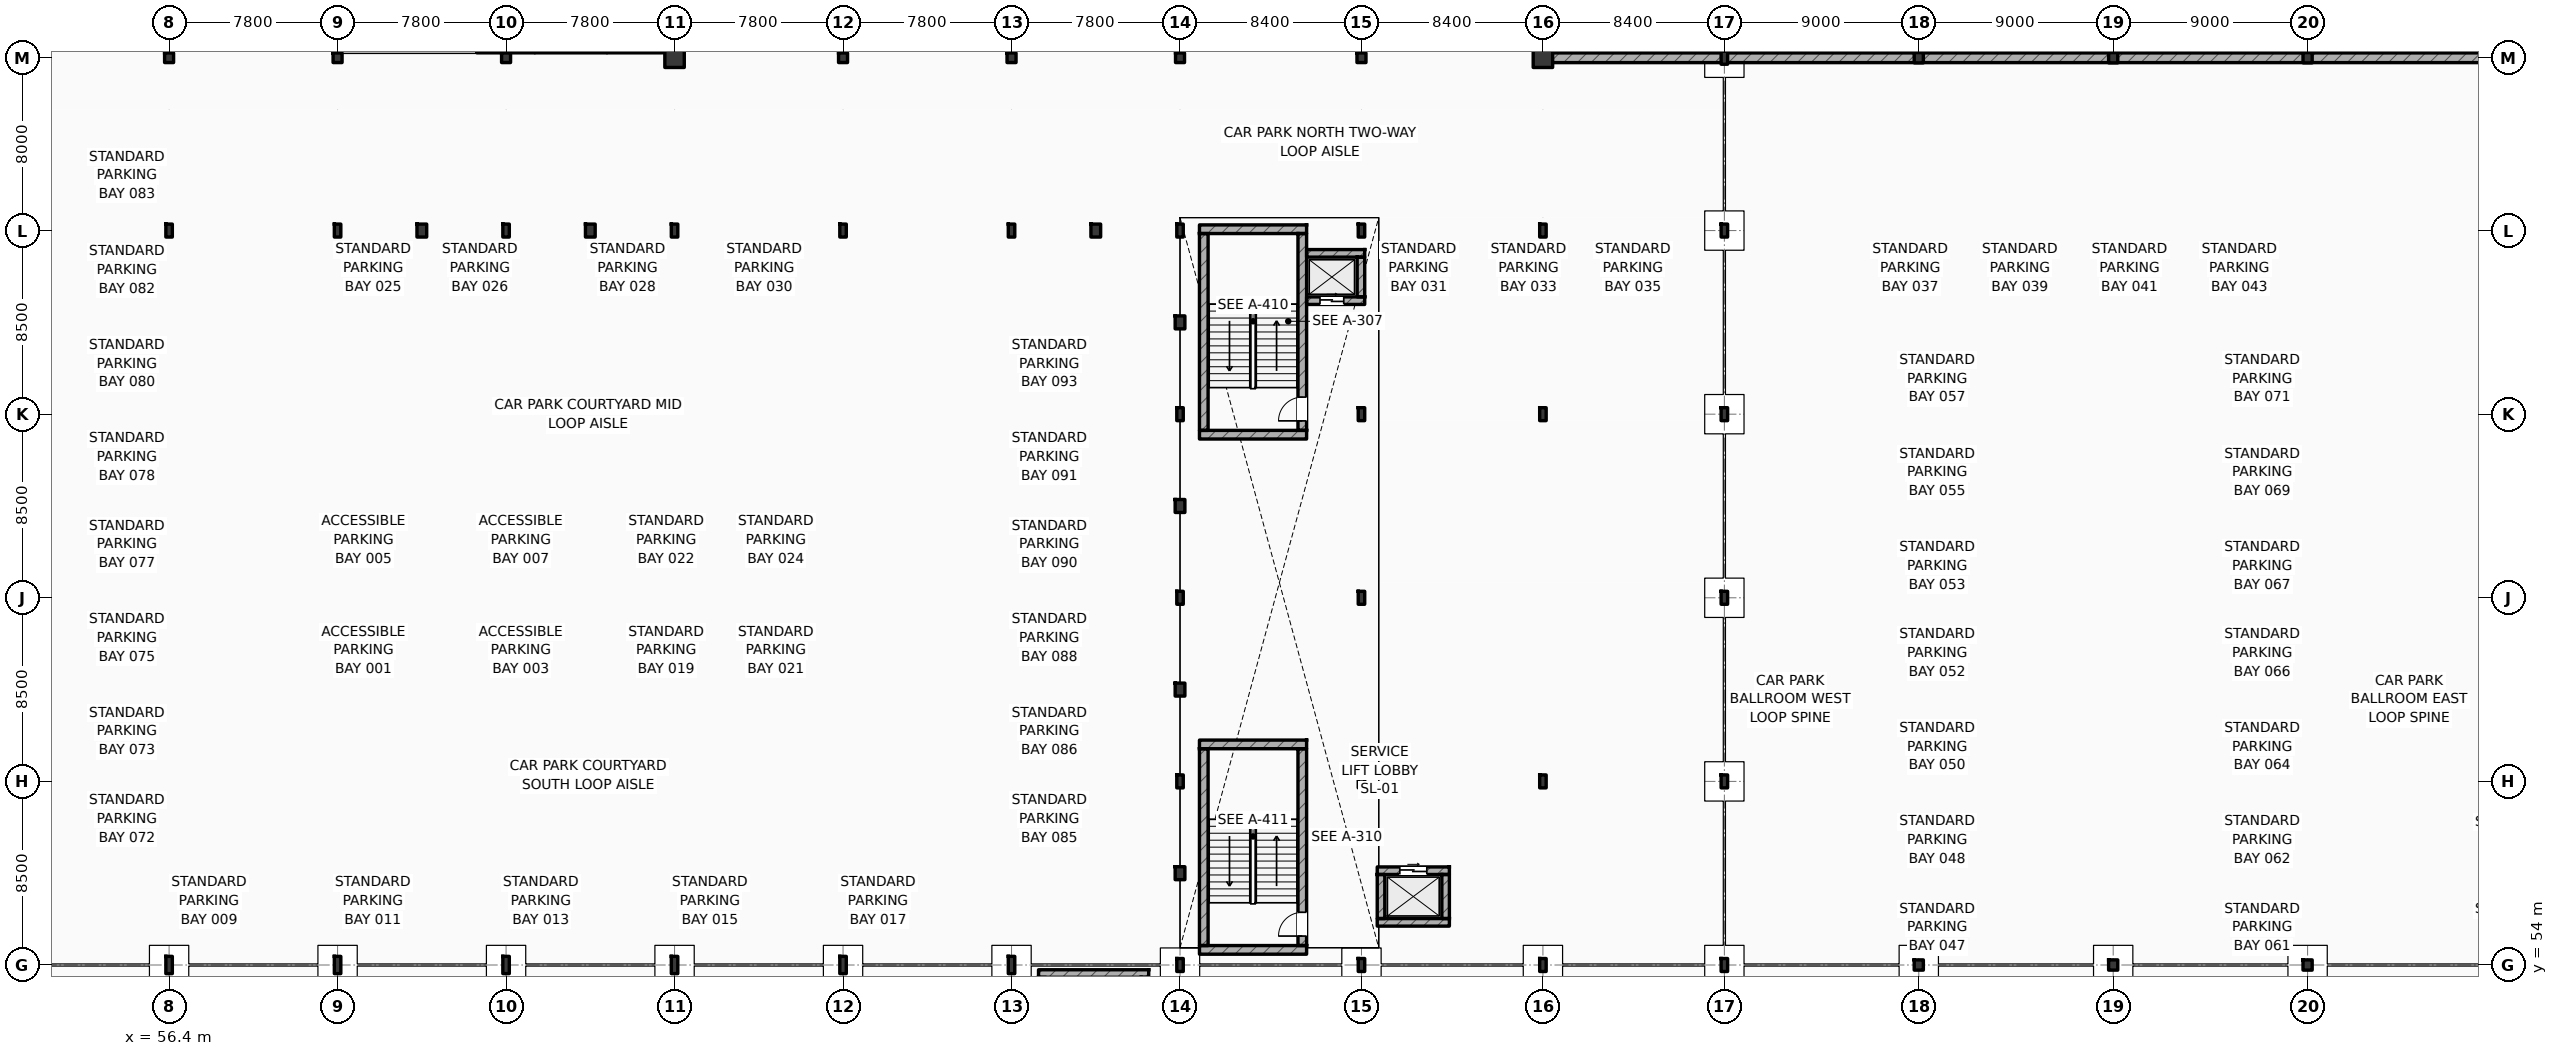
"""IFC4 building model, lengths in metres.
Left out: names, types, materials, properties, quantities, classifications, styles, units other than length and angle.
Written with IfcOpenShell. Run it as: python <this file> out.ifc"""

import sys

from ifc_helpers import new_model, si_unit, direction, frame, frame_2d, origin, origin_2d, place, context, subcontext, project, spatial, rectangle, i_section, extrude, element, fill, save


model = new_model("IFC4")
c1 = context("Model", 3, precision=1e-05, world=origin(), true_north=direction((0.0, 1.0)))
c2 = subcontext(c1, "Body", "Model", "MODEL_VIEW")
j1 = project(units=[si_unit("LENGTHUNIT", "METRE"), si_unit("PLANEANGLEUNIT", "RADIAN")], contexts=[c1])
p1 = place(None, origin())
s1 = spatial("IfcSite", under=j1, at=p1, CompositionType="ELEMENT")
p2 = place(p1, origin())
s2 = spatial("IfcBuilding", under=s1, at=p2, CompositionType="ELEMENT")
p3 = place(p2, frame((0.0, 0.0, -4.5)))
s3 = spatial("IfcBuildingStorey", under=s2, at=p3, CompositionType="ELEMENT", Elevation=-4.5)
p4 = place(p3, frame((172.0, 96.0, 0.0), z_axis=(0.0, 0.0, 1.0), x_axis=(-1.0, 0.0, 0.0)))
e1 = element("IfcWall", 1, at=p4, inside=s3, PredefinedType="SOLIDWALL", context=c2, shape_type="SweptSolid", body=[
    extrude(rectangle(XDim=52.0, YDim=0.45, at=frame_2d((26.0, 0.0))), origin(), (0.0, 0.0, 1.0), 4.5),
])
p5 = place(p3, frame((120.0, 96.0, 0.0), z_axis=(0.0, 0.0, 1.0), x_axis=(0.0, 1.0, 0.0)))
e2 = element("IfcWall", 2, at=p5, inside=s3, PredefinedType="SOLIDWALL", context=c2, shape_type="SweptSolid", body=[
    extrude(rectangle(XDim=22.0, YDim=0.45, at=frame_2d((11.0, 0.0))), origin(), (0.0, 0.0, 1.0), 4.5),
])
for number, where, z_axis, x_axis in (
    (3, (56.4, 96.0, 0.0), (0.0, 0.0, 1.0), (1.0, 0.0, 0.0)),
    (4, (64.2, 96.0, 0.0), (0.0, 0.0, 1.0), (1.0, 0.0, 0.0)),
    (5, (72.0, 96.0, 0.0), (0.0, 0.0, 1.0), (1.0, 0.0, 0.0)),
):
    element("IfcColumn", number, at=place(p3, frame(where, z_axis=z_axis, x_axis=x_axis)), inside=s3, PredefinedType="COLUMN", context=c2, shape_type="SweptSolid", body=[
        extrude(i_section(OverallWidth=0.416, OverallDepth=0.446, WebThickness=0.036, FlangeThickness=0.048, FilletRadius=0.015, at=origin_2d()), origin(), (0.0, 0.0, 1.0), 4.5),
    ])
p6 = place(p3, frame((79.8, 96.0, 0.0), z_axis=(0.0, 0.0, 1.0), x_axis=(1.0, 0.0, 0.0)))
e6 = element("IfcColumn", 6, at=p6, inside=s3, PredefinedType="COLUMN", context=c2, shape_type="SweptSolid", body=[
    extrude(rectangle(XDim=0.9, YDim=0.9, at=origin_2d()), origin(), (0.0, 0.0, 1.0), 4.5),
])
for number, where, z_axis, x_axis in (
    (7, (87.6, 96.0, 0.0), (0.0, 0.0, 1.0), (1.0, 0.0, 0.0)),
    (8, (95.4, 96.0, 0.0), (0.0, 0.0, 1.0), (1.0, 0.0, 0.0)),
    (9, (103.2, 96.0, 0.0), (0.0, 0.0, 1.0), (1.0, 0.0, 0.0)),
    (10, (111.6, 96.0, 0.0), (0.0, 0.0, 1.0), (1.0, 0.0, 0.0)),
):
    element("IfcColumn", number, at=place(p3, frame(where, z_axis=z_axis, x_axis=x_axis)), inside=s3, PredefinedType="COLUMN", context=c2, shape_type="SweptSolid", body=[
        extrude(i_section(OverallWidth=0.416, OverallDepth=0.446, WebThickness=0.036, FlangeThickness=0.048, FilletRadius=0.015, at=origin_2d()), origin(), (0.0, 0.0, 1.0), 4.5),
    ])
p7 = place(p3, frame((120.0, 96.0, 0.0), z_axis=(0.0, 0.0, 1.0), x_axis=(1.0, 0.0, 0.0)))
e11 = element("IfcColumn", 11, at=p7, inside=s3, PredefinedType="COLUMN", context=c2, shape_type="SweptSolid", body=[
    extrude(rectangle(XDim=0.9, YDim=0.9, at=origin_2d()), origin(), (0.0, 0.0, 1.0), 4.5),
])
for number, where, z_axis, x_axis in (
    (12, (56.4, 88.0, 0.0), (0.0, 0.0, 1.0), (1.0, 0.0, 0.0)),
    (13, (64.2, 88.0, 0.0), (0.0, 0.0, 1.0), (1.0, 0.0, 0.0)),
    (14, (72.0, 88.0, 0.0), (0.0, 0.0, 1.0), (1.0, 0.0, 0.0)),
    (15, (79.8, 88.0, 0.0), (0.0, 0.0, 1.0), (1.0, 0.0, 0.0)),
    (16, (87.6, 88.0, 0.0), (0.0, 0.0, 1.0), (1.0, 0.0, 0.0)),
    (17, (95.4, 88.0, 0.0), (0.0, 0.0, 1.0), (1.0, 0.0, 0.0)),
    (18, (103.2, 88.0, 0.0), (0.0, 0.0, 1.0), (1.0, 0.0, 0.0)),
    (19, (103.2, 54.0, 0.0), (0.0, 0.0, 1.0), (1.0, 0.0, 0.0)),
    (20, (103.2, 62.5, 0.0), (0.0, 0.0, 1.0), (1.0, 0.0, 0.0)),
    (21, (103.2, 71.0, 0.0), (0.0, 0.0, 1.0), (1.0, 0.0, 0.0)),
    (22, (103.2, 79.5, 0.0), (0.0, 0.0, 1.0), (1.0, 0.0, 0.0)),
    (23, (111.6, 54.0, 0.0), (0.0, 0.0, 1.0), (1.0, 0.0, 0.0)),
    (24, (111.6, 62.5, 0.0), (0.0, 0.0, 1.0), (1.0, 0.0, 0.0)),
    (25, (111.6, 71.0, 0.0), (0.0, 0.0, 1.0), (1.0, 0.0, 0.0)),
    (26, (111.6, 79.5, 0.0), (0.0, 0.0, 1.0), (1.0, 0.0, 0.0)),
    (27, (111.6, 88.0, 0.0), (0.0, 0.0, 1.0), (1.0, 0.0, 0.0)),
    (28, (120.0, 54.0, 0.0), (0.0, 0.0, 1.0), (1.0, 0.0, 0.0)),
    (29, (120.0, 62.5, 0.0), (0.0, 0.0, 1.0), (1.0, 0.0, 0.0)),
    (30, (120.0, 79.5, 0.0), (0.0, 0.0, 1.0), (1.0, 0.0, 0.0)),
    (31, (120.0, 88.0, 0.0), (0.0, 0.0, 1.0), (1.0, 0.0, 0.0)),
    (32, (128.4, 54.0, 0.0), (0.0, 0.0, 1.0), (1.0, 0.0, 0.0)),
    (33, (128.4, 62.5, 0.0), (0.0, 0.0, 1.0), (1.0, 0.0, 0.0)),
    (34, (128.4, 71.0, 0.0), (0.0, 0.0, 1.0), (1.0, 0.0, 0.0)),
    (35, (128.4, 79.5, 0.0), (0.0, 0.0, 1.0), (1.0, 0.0, 0.0)),
    (36, (128.4, 88.0, 0.0), (0.0, 0.0, 1.0), (1.0, 0.0, 0.0)),
    (37, (128.4, 96.0, 0.0), (0.0, 0.0, 1.0), (1.0, 0.0, 0.0)),
):
    element("IfcColumn", number, at=place(p3, frame(where, z_axis=z_axis, x_axis=x_axis)), inside=s3, PredefinedType="COLUMN", context=c2, shape_type="SweptSolid", body=[
        extrude(i_section(OverallWidth=0.3, OverallDepth=0.6, WebThickness=0.015, FlangeThickness=0.03, FilletRadius=0.027, at=origin_2d()), origin(), (0.0, 0.0, 1.0), 4.5),
    ])
for number, where, z_axis, x_axis in (
    (38, (137.4, 54.0, 0.0), (0.0, 0.0, 1.0), (1.0, 0.0, 0.0)),
    (39, (137.4, 96.0, 0.0), (0.0, 0.0, 1.0), (1.0, 0.0, 0.0)),
    (40, (146.4, 54.0, 0.0), (0.0, 0.0, 1.0), (1.0, 0.0, 0.0)),
    (41, (146.4, 96.0, 0.0), (0.0, 0.0, 1.0), (1.0, 0.0, 0.0)),
    (42, (155.4, 54.0, 0.0), (0.0, 0.0, 1.0), (1.0, 0.0, 0.0)),
    (43, (155.4, 96.0, 0.0), (0.0, 0.0, 1.0), (1.0, 0.0, 0.0)),
):
    element("IfcColumn", number, at=place(p3, frame(where, z_axis=z_axis, x_axis=x_axis)), inside=s3, PredefinedType="COLUMN", context=c2, shape_type="SweptSolid", body=[
        extrude(i_section(OverallWidth=0.424, OverallDepth=0.474, WebThickness=0.045, FlangeThickness=0.055, FilletRadius=0.015, at=origin_2d()), origin(), (0.0, 0.0, 1.0), 4.5),
    ])
for number, where, z_axis, x_axis in (
    (44, (56.4, 54.0, 0.0), (0.0, 0.0, 1.0), (1.0, 0.0, 0.0)),
    (45, (64.2, 54.0, 0.0), (0.0, 0.0, 1.0), (1.0, 0.0, 0.0)),
    (46, (72.0, 54.0, 0.0), (0.0, 0.0, 1.0), (1.0, 0.0, 0.0)),
    (47, (79.8, 54.0, 0.0), (0.0, 0.0, 1.0), (1.0, 0.0, 0.0)),
    (48, (87.6, 54.0, 0.0), (0.0, 0.0, 1.0), (1.0, 0.0, 0.0)),
    (49, (95.4, 54.0, 0.0), (0.0, 0.0, 1.0), (1.0, 0.0, 0.0)),
):
    element("IfcColumn", number, at=place(p3, frame(where, z_axis=z_axis, x_axis=x_axis)), inside=s3, PredefinedType="COLUMN", context=c2, shape_type="SweptSolid", body=[
        extrude(i_section(OverallWidth=0.3, OverallDepth=0.8, WebThickness=0.018, FlangeThickness=0.033, FilletRadius=0.03, at=origin_2d()), origin(), (0.0, 0.0, 1.0), 4.5),
    ])
for number, where, z_axis, x_axis in (
    (50, (103.2, 58.25, 0.0), (0.0, 0.0, 1.0), (1.0, 0.0, 0.0)),
    (51, (103.2, 66.75, 0.0), (0.0, 0.0, 1.0), (1.0, 0.0, 0.0)),
    (52, (103.2, 75.25, 0.0), (0.0, 0.0, 1.0), (1.0, 0.0, 0.0)),
    (53, (103.2, 83.75, 0.0), (0.0, 0.0, 1.0), (1.0, 0.0, 0.0)),
    (54, (68.1, 88.0, 0.0), (0.0, 0.0, 1.0), (1.0, 0.0, 0.0)),
    (55, (75.9, 88.0, 0.0), (0.0, 0.0, 1.0), (1.0, 0.0, 0.0)),
    (56, (99.3, 88.0, 0.0), (0.0, 0.0, 1.0), (1.0, 0.0, 0.0)),
):
    element("IfcColumn", number, at=place(p3, frame(where, z_axis=z_axis, x_axis=x_axis)), inside=s3, PredefinedType="PILASTER", context=c2, shape_type="SweptSolid", body=[
        extrude(rectangle(XDim=0.45, YDim=0.6, at=origin_2d()), origin(), (0.0, 0.0, 1.0), 4.5),
    ])
for number, where, z_axis, x_axis in (
    (57, (104.1, 88.062, 0.0), (0.0, 0.0, 1.0), (1.0, 0.0, 0.0)),
    (58, (104.1, 78.55, 0.0), (0.0, 0.0, 1.0), (1.0, 0.0, 0.0)),
):
    element("IfcWall", number, at=place(p3, frame(where, z_axis=z_axis, x_axis=x_axis)), inside=s3, PredefinedType="SHEAR", context=c2, shape_type="SweptSolid", body=[
        extrude(rectangle(XDim=4.96, YDim=0.4, at=frame_2d((2.48, 0.0))), origin(), (0.0, 0.0, 1.0), 4.5),
    ])
p8 = place(p3, frame((104.3, 78.75, 0.0), z_axis=(0.0, 0.0, 1.0), x_axis=(0.0, 1.0, 0.0)))
e59 = element("IfcWall", 59, at=p8, inside=s3, PredefinedType="SHEAR", context=c2, shape_type="SweptSolid", body=[
    extrude(rectangle(XDim=9.112, YDim=0.4, at=frame_2d((4.556, 0.0))), origin(), (0.0, 0.0, 1.0), 4.5),
])
p9 = place(p3, frame((108.86, 78.75, 0.0), z_axis=(0.0, 0.0, 1.0), x_axis=(0.0, 1.0, 0.0)))
e60 = element("IfcWall", 60, at=p9, inside=s3, PredefinedType="SHEAR", context=c2, shape_type="SweptSolid", body=[
    extrude(rectangle(XDim=9.112, YDim=0.4, at=frame_2d((4.556, 0.0))), origin(), (0.0, 0.0, 1.0), 4.5),
])
p10 = place(p9, frame((0.44, 0.0, 0.0)))
e61 = element("IfcOpeningElement", 61, at=p10, cuts=e60, PredefinedType="OPENING", context=c2, shape_type="SweptSolid", body=[
    extrude(rectangle(XDim=1.1, YDim=2.2, at=frame_2d((0.55, 1.1))), frame((0.0, 0.21, 0.0), z_axis=(0.0, -1.0, 0.0), x_axis=(1.0, 0.0, 0.0)), (0.0, 0.0, 1.0), 0.42),
])
for number, where, z_axis, x_axis in (
    (62, (104.1, 64.212, 0.0), (0.0, 0.0, 1.0), (1.0, 0.0, 0.0)),
    (63, (104.1, 54.7, 0.0), (0.0, 0.0, 1.0), (1.0, 0.0, 0.0)),
):
    element("IfcWall", number, at=place(p3, frame(where, z_axis=z_axis, x_axis=x_axis)), inside=s3, PredefinedType="SHEAR", context=c2, shape_type="SweptSolid", body=[
        extrude(rectangle(XDim=4.96, YDim=0.4, at=frame_2d((2.48, 0.0))), origin(), (0.0, 0.0, 1.0), 4.5),
    ])
p11 = place(p3, frame((104.3, 54.9, 0.0), z_axis=(0.0, 0.0, 1.0), x_axis=(0.0, 1.0, 0.0)))
e64 = element("IfcWall", 64, at=p11, inside=s3, PredefinedType="SHEAR", context=c2, shape_type="SweptSolid", body=[
    extrude(rectangle(XDim=9.112, YDim=0.4, at=frame_2d((4.556, 0.0))), origin(), (0.0, 0.0, 1.0), 4.5),
])
p12 = place(p3, frame((108.86, 54.9, 0.0), z_axis=(0.0, 0.0, 1.0), x_axis=(0.0, 1.0, 0.0)))
e65 = element("IfcWall", 65, at=p12, inside=s3, PredefinedType="SHEAR", context=c2, shape_type="SweptSolid", body=[
    extrude(rectangle(XDim=9.112, YDim=0.4, at=frame_2d((4.556, 0.0))), origin(), (0.0, 0.0, 1.0), 4.5),
])
p13 = place(p12, frame((0.44, 0.0, 0.0)))
e66 = element("IfcOpeningElement", 66, at=p13, cuts=e65, PredefinedType="OPENING", context=c2, shape_type="SweptSolid", body=[
    extrude(rectangle(XDim=1.1, YDim=2.2, at=frame_2d((0.55, 1.1))), frame((0.0, 0.21, 0.0), z_axis=(0.0, -1.0, 0.0), x_axis=(1.0, 0.0, 0.0)), (0.0, 0.0, 1.0), 0.42),
])
p14 = place(p3, frame((96.65, 53.605, 0.0), z_axis=(0.0, 0.0, 1.0), x_axis=(1.0, 0.0, 0.0)))
e67 = element("IfcWall", 67, at=p14, inside=s3, PredefinedType="SHEAR", context=c2, shape_type="SweptSolid", body=[
    extrude(rectangle(XDim=5.1, YDim=0.35, at=frame_2d((2.55, 0.0))), origin(), (0.0, 0.0, 1.0), 4.5),
])
p15 = place(p3, frame((70.64, 96.405, 0.0), z_axis=(0.0, 0.0, 1.0), x_axis=(1.0, 0.0, 0.0)))
e68 = element("IfcWall", 68, at=p15, inside=s3, PredefinedType="SHEAR", context=c2, shape_type="SweptSolid", body=[
    extrude(rectangle(XDim=2.69, YDim=0.35, at=frame_2d((1.345, 0.0))), origin(), (0.0, 0.0, 1.0), 4.1),
])
p16 = place(p3, frame((73.33, 96.405, 0.0), z_axis=(0.0, 0.0, 1.0), x_axis=(1.0, 0.0, 0.0)))
e69 = element("IfcWall", 69, at=p16, inside=s3, PredefinedType="SHEAR", context=c2, shape_type="SweptSolid", body=[
    extrude(rectangle(XDim=3.34, YDim=0.35, at=frame_2d((1.67, 0.0))), origin(), (0.0, 0.0, 1.0), 4.1),
])
p17 = place(p3, frame((76.67, 96.405, 0.0), z_axis=(0.0, 0.0, 1.0), x_axis=(1.0, 0.0, 0.0)))
e70 = element("IfcWall", 70, at=p17, inside=s3, PredefinedType="SHEAR", context=c2, shape_type="SweptSolid", body=[
    extrude(rectangle(XDim=2.99, YDim=0.35, at=frame_2d((1.495, 0.0))), origin(), (0.0, 0.0, 1.0), 4.1),
])
p18 = place(p3, frame((109.06, 86.945, 0.0), z_axis=(0.0, 0.0, 1.0), x_axis=(1.0, 0.0, 0.0)))
e71 = element("IfcWall", 71, at=p18, inside=s3, PredefinedType="SHEAR", context=c2, shape_type="SweptSolid", body=[
    extrude(rectangle(XDim=2.69, YDim=0.35, at=frame_2d((1.345, 0.0))), origin(), (0.0, 0.0, 1.0), 4.1),
])
p19 = place(p3, frame((109.06, 84.755, 0.0), z_axis=(0.0, 0.0, 1.0), x_axis=(1.0, 0.0, 0.0)))
e72 = element("IfcWall", 72, at=p19, inside=s3, PredefinedType="SHEAR", context=c2, shape_type="SweptSolid", body=[
    extrude(rectangle(XDim=2.69, YDim=0.35, at=frame_2d((1.345, 0.0))), origin(), (0.0, 0.0, 1.0), 4.1),
])
p20 = place(p19, frame((0.62, 0.0, 0.0)))
e73 = element("IfcOpeningElement", 73, at=p20, cuts=e72, PredefinedType="OPENING", context=c2, shape_type="SweptSolid", body=[
    extrude(rectangle(XDim=1.1, YDim=2.2, at=frame_2d((0.55, 1.1))), frame((0.0, 0.185, 0.0), z_axis=(0.0, -1.0, 0.0), x_axis=(1.0, 0.0, 0.0)), (0.0, 0.0, 1.0), 0.37),
])
p21 = place(p3, frame((111.575, 84.93, 0.0), z_axis=(0.0, 0.0, 1.0), x_axis=(0.0, 1.0, 0.0)))
e74 = element("IfcWall", 74, at=p21, inside=s3, PredefinedType="SHEAR", context=c2, shape_type="SweptSolid", body=[
    extrude(rectangle(XDim=1.84, YDim=0.35, at=frame_2d((0.92, 0.0))), origin(), (0.0, 0.0, 1.0), 3.6),
])
p22 = place(p3, frame((112.33, 58.365, 0.0), z_axis=(0.0, 0.0, 1.0), x_axis=(1.0, 0.0, 0.0)))
e75 = element("IfcWall", 75, at=p22, inside=s3, PredefinedType="SHEAR", context=c2, shape_type="SweptSolid", body=[
    extrude(rectangle(XDim=3.34, YDim=0.35, at=frame_2d((1.67, 0.0))), origin(), (0.0, 0.0, 1.0), 4.1),
])
p23 = place(p22, frame((1.045, 0.0, 0.0)))
e76 = element("IfcOpeningElement", 76, at=p23, cuts=e75, PredefinedType="OPENING", context=c2, shape_type="SweptSolid", body=[
    extrude(rectangle(XDim=1.25, YDim=2.25, at=frame_2d((0.625, 1.125))), frame((0.0, 0.185, 0.0), z_axis=(0.0, -1.0, 0.0), x_axis=(1.0, 0.0, 0.0)), (0.0, 0.0, 1.0), 0.37),
])
p24 = place(p3, frame((112.33, 55.975, 0.0), z_axis=(0.0, 0.0, 1.0), x_axis=(1.0, 0.0, 0.0)))
e77 = element("IfcWall", 77, at=p24, inside=s3, PredefinedType="SHEAR", context=c2, shape_type="SweptSolid", body=[
    extrude(rectangle(XDim=3.34, YDim=0.35, at=frame_2d((1.67, 0.0))), origin(), (0.0, 0.0, 1.0), 4.1),
])
for number, where, z_axis, x_axis in (
    (78, (112.505, 56.15, 0.0), (0.0, 0.0, 1.0), (0.0, 1.0, 0.0)),
    (79, (115.495, 56.15, 0.0), (0.0, 0.0, 1.0), (0.0, 1.0, 0.0)),
):
    element("IfcWall", number, at=place(p3, frame(where, z_axis=z_axis, x_axis=x_axis)), inside=s3, PredefinedType="SHEAR", context=c2, shape_type="SweptSolid", body=[
        extrude(rectangle(XDim=2.04, YDim=0.35, at=frame_2d((1.02, 0.0))), origin(), (0.0, 0.0, 1.0), 4.1),
    ])
p25 = place(p10, origin())
e80 = element("IfcDoor", 80, at=p25, inside=s3, OperationType="SINGLE_SWING_LEFT", PredefinedType="DOOR", context=c2, shape_type="SweptSolid", body=[
    extrude(rectangle(XDim=1.1, YDim=2.2, at=frame_2d((0.55, 1.1))), frame((0.0, 0.025, 0.0), z_axis=(0.0, -1.0, 0.0), x_axis=(1.0, 0.0, 0.0)), (0.0, 0.0, 1.0), 0.05),
])
fill(e61, e80)
p26 = place(p13, origin())
e81 = element("IfcDoor", 81, at=p26, inside=s3, OperationType="SINGLE_SWING_LEFT", PredefinedType="DOOR", context=c2, shape_type="SweptSolid", body=[
    extrude(rectangle(XDim=1.1, YDim=2.2, at=frame_2d((0.55, 1.1))), frame((0.0, 0.025, 0.0), z_axis=(0.0, -1.0, 0.0), x_axis=(1.0, 0.0, 0.0)), (0.0, 0.0, 1.0), 0.05),
])
fill(e66, e81)
p27 = place(p20, origin())
e82 = element("IfcDoor", 82, at=p27, inside=s3, OperationType="SLIDING_TO_LEFT", PredefinedType="DOOR", context=c2, shape_type="SweptSolid", body=[
    extrude(rectangle(XDim=1.1, YDim=2.2, at=frame_2d((0.55, 1.1))), frame((0.0, 0.025, 0.0), z_axis=(0.0, -1.0, 0.0), x_axis=(1.0, 0.0, 0.0)), (0.0, 0.0, 1.0), 0.05),
])
fill(e73, e82)
p28 = place(p23, origin())
e83 = element("IfcDoor", 83, at=p28, inside=s3, OperationType="SLIDING_TO_LEFT", PredefinedType="DOOR", context=c2, shape_type="SweptSolid", body=[
    extrude(rectangle(XDim=1.25, YDim=2.25, at=frame_2d((0.625, 1.125))), frame((0.0, 0.025, 0.0), z_axis=(0.0, -1.0, 0.0), x_axis=(1.0, 0.0, 0.0)), (0.0, 0.0, 1.0), 0.05),
])
fill(e76, e83)
save(model, sys.argv[1])
